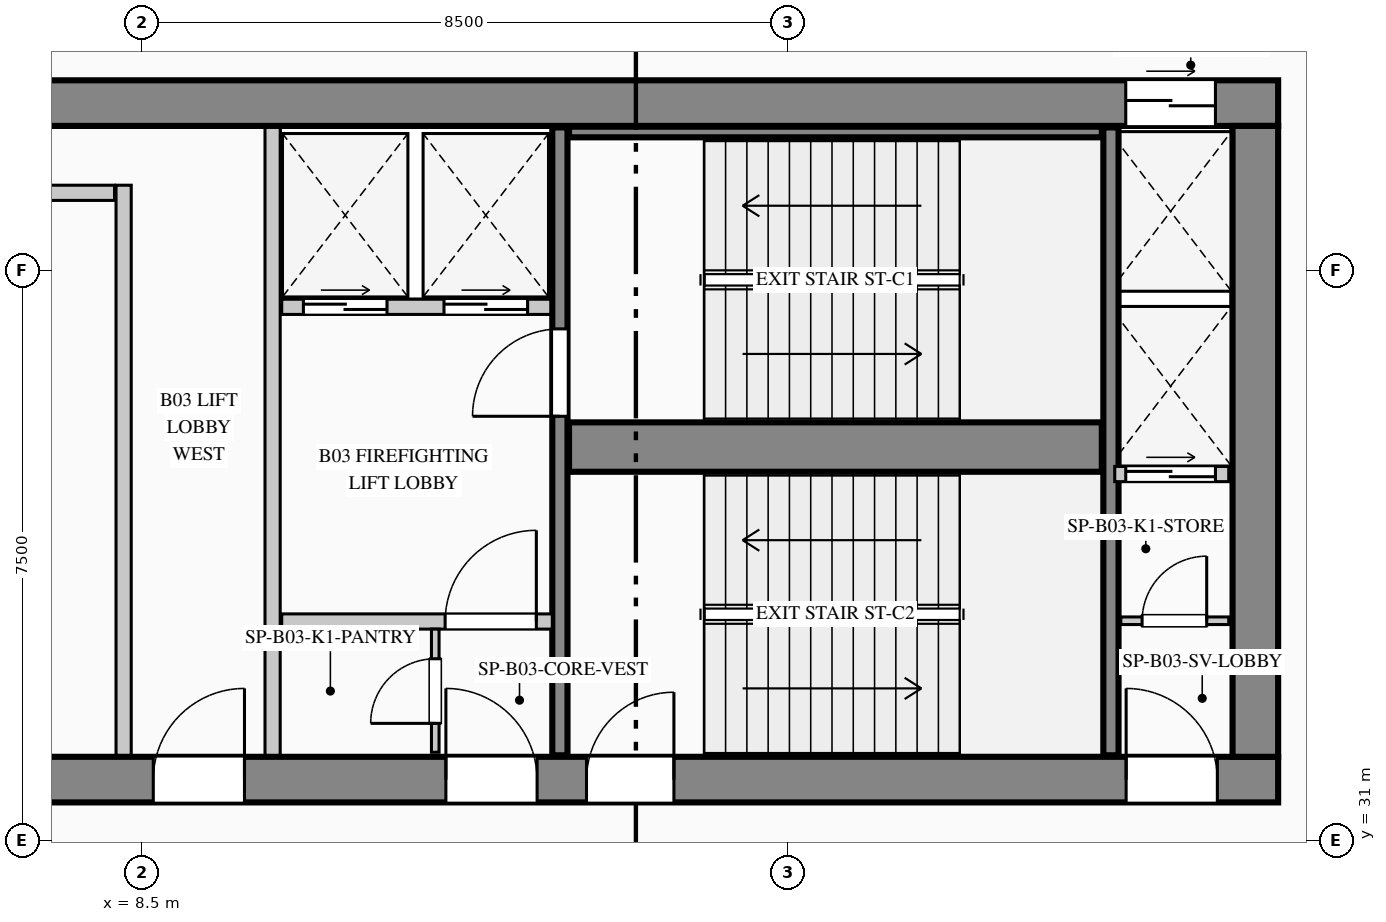
"""IFC4 building model, lengths in metres.
Left out: names, types, materials, properties, quantities, classifications, styles, units other than length and angle.
Written with IfcOpenShell. Run it as: python <this file> out.ifc"""

import sys

from ifc_helpers import new_model, si_unit, direction, frame, frame_2d, origin, place, context, subcontext, project, spatial, rectangle, extrude, element, fill, save


model = new_model("IFC4")
c1 = context("Model", 3, precision=1e-05, world=origin(), true_north=direction((0.0, 1.0)))
c2 = subcontext(c1, "Body", "Model", "MODEL_VIEW")
j1 = project(units=[si_unit("LENGTHUNIT", "METRE"), si_unit("PLANEANGLEUNIT", "RADIAN")], contexts=[c1])
p1 = place(None, origin())
s1 = spatial("IfcSite", under=j1, at=p1, CompositionType="ELEMENT")
p2 = place(p1, origin())
s2 = spatial("IfcBuilding", under=s1, at=p2, CompositionType="ELEMENT")
p3 = place(p2, frame((0.0, 0.0, -13.5)))
s3 = spatial("IfcBuildingStorey", under=s2, at=p3, CompositionType="ELEMENT", Elevation=-13.5)
p4 = place(p3, frame((5.4, 40.7, 0.0), z_axis=(0.0, 0.0, 1.0), x_axis=(1.0, 0.0, 0.0)))
e1 = element("IfcWall", 1, at=p4, inside=s3, PredefinedType="SHEAR", context=c2, shape_type="SweptSolid", body=[
    extrude(rectangle(XDim=18.05, YDim=0.6, at=frame_2d((9.025, 0.0))), origin(), (0.0, 0.0, 1.0), 4.5),
])
p5 = place(p4, frame((16.045, 0.0, 0.0)))
e2 = element("IfcOpeningElement", 2, at=p5, cuts=e1, PredefinedType="OPENING", context=c2, shape_type="SweptSolid", body=[
    extrude(rectangle(XDim=1.18, YDim=2.25, at=frame_2d((0.59, 1.125))), frame((0.0, 0.31, 0.0), z_axis=(0.0, -1.0, 0.0), x_axis=(1.0, 0.0, 0.0)), (0.0, 0.0, 1.0), 0.62),
])
p6 = place(p3, frame((5.4, 31.8, 0.0), z_axis=(0.0, 0.0, 1.0), x_axis=(1.0, 0.0, 0.0)))
e3 = element("IfcWall", 3, at=p6, inside=s3, PredefinedType="SHEAR", context=c2, shape_type="SweptSolid", body=[
    extrude(rectangle(XDim=18.05, YDim=0.6, at=frame_2d((9.025, 0.0))), origin(), (0.0, 0.0, 1.0), 4.5),
])
p7 = place(p6, frame((3.25, 0.0, 0.0)))
e4 = element("IfcOpeningElement", 4, at=p7, cuts=e3, PredefinedType="OPENING", context=c2, shape_type="SweptSolid", body=[
    extrude(rectangle(XDim=1.2, YDim=2.2, at=frame_2d((0.6, 1.1))), frame((0.0, 0.31, 0.0), z_axis=(0.0, -1.0, 0.0), x_axis=(1.0, 0.0, 0.0)), (0.0, 0.0, 1.0), 0.62),
])
p8 = place(p6, frame((7.1, 0.0, 0.0)))
e5 = element("IfcOpeningElement", 5, at=p8, cuts=e3, PredefinedType="OPENING", context=c2, shape_type="SweptSolid", body=[
    extrude(rectangle(XDim=1.2, YDim=2.2, at=frame_2d((0.6, 1.1))), frame((0.0, 0.31, 0.0), z_axis=(0.0, -1.0, 0.0), x_axis=(1.0, 0.0, 0.0)), (0.0, 0.0, 1.0), 0.62),
])
p9 = place(p6, frame((8.95, 0.0, 0.0)))
e6 = element("IfcOpeningElement", 6, at=p9, cuts=e3, PredefinedType="OPENING", context=c2, shape_type="SweptSolid", body=[
    extrude(rectangle(XDim=1.15, YDim=2.2, at=frame_2d((0.575, 1.1))), frame((0.0, 0.31, 0.0), z_axis=(0.0, -1.0, 0.0), x_axis=(1.0, 0.0, 0.0)), (0.0, 0.0, 1.0), 0.62),
])
p10 = place(p6, frame((16.05, 0.0, 0.0)))
e7 = element("IfcOpeningElement", 7, at=p10, cuts=e3, PredefinedType="OPENING", context=c2, shape_type="SweptSolid", body=[
    extrude(rectangle(XDim=1.2, YDim=2.2, at=frame_2d((0.6, 1.1))), frame((0.0, 0.31, 0.0), z_axis=(0.0, -1.0, 0.0), x_axis=(1.0, 0.0, 0.0)), (0.0, 0.0, 1.0), 0.62),
])
p11 = place(p3, frame((23.15, 32.1, 0.0), z_axis=(0.0, 0.0, 1.0), x_axis=(0.0, 1.0, 0.0)))
e8 = element("IfcWall", 8, at=p11, inside=s3, PredefinedType="SHEAR", context=c2, shape_type="SweptSolid", body=[
    extrude(rectangle(XDim=8.3, YDim=0.6, at=frame_2d((4.15, 0.0))), origin(), (0.0, 0.0, 1.0), 4.5),
])
p12 = place(p3, frame((14.0, 32.12, 0.0), z_axis=(0.0, 0.0, 1.0), x_axis=(0.0, 1.0, 0.0)))
e9 = element("IfcWall", 9, at=p12, inside=s3, PredefinedType="SHEAR", context=c2, shape_type="SweptSolid", body=[
    extrude(rectangle(XDim=8.26, YDim=0.2, at=frame_2d((4.13, 0.0))), origin(), (0.0, 0.0, 1.0), 4.5),
])
p13 = place(p12, frame((4.46, 0.0, 0.0)))
e10 = element("IfcOpeningElement", 10, at=p13, cuts=e9, PredefinedType="OPENING", context=c2, shape_type="SweptSolid", body=[
    extrude(rectangle(XDim=1.15, YDim=2.2, at=frame_2d((0.575, 1.1))), frame((0.0, 0.11, 0.0), z_axis=(0.0, -1.0, 0.0), x_axis=(1.0, 0.0, 0.0)), (0.0, 0.0, 1.0), 0.22),
])
p14 = place(p3, frame((14.12, 36.175, 0.0), z_axis=(0.0, 0.0, 1.0), x_axis=(1.0, 0.0, 0.0)))
e11 = element("IfcWall", 11, at=p14, inside=s3, PredefinedType="SHEAR", context=c2, shape_type="SweptSolid", body=[
    extrude(rectangle(XDim=7.01, YDim=0.65, at=frame_2d((3.505, 0.0))), origin(), (0.0, 0.0, 1.0), 4.5),
])
p15 = place(p3, frame((21.25, 32.12, 0.0), z_axis=(0.0, 0.0, 1.0), x_axis=(0.0, 1.0, 0.0)))
e12 = element("IfcWall", 12, at=p15, inside=s3, PredefinedType="SHEAR", context=c2, shape_type="SweptSolid", body=[
    extrude(rectangle(XDim=8.26, YDim=0.2, at=frame_2d((4.13, 0.0))), origin(), (0.0, 0.0, 1.0), 4.5),
])
p16 = place(p3, frame((14.12, 40.32, 0.0), z_axis=(0.0, 0.0, 1.0), x_axis=(1.0, 0.0, 0.0)))
e13 = element("IfcWall", 13, at=p16, inside=s3, PredefinedType="SHEAR", context=c2, shape_type="SweptSolid", body=[
    extrude(rectangle(XDim=7.01, YDim=0.14, at=frame_2d((3.505, 0.0))), origin(), (0.0, 0.0, 1.0), 4.5),
])
p17 = place(p3, frame((8.26, 32.12, 0.0), z_axis=(0.0, 0.0, 1.0), x_axis=(0.0, 1.0, 0.0)))
e14 = element("IfcWall", 14, at=p17, inside=s3, PredefinedType="PARTITIONING", context=c2, shape_type="SweptSolid", body=[
    extrude(rectangle(XDim=7.5, YDim=0.2, at=frame_2d((3.75, 0.0))), origin(), (0.0, 0.0, 1.0), 4.15),
])
p18 = place(p3, frame((6.02, 39.52, 0.0), z_axis=(0.0, 0.0, 1.0), x_axis=(1.0, 0.0, 0.0)))
e15 = element("IfcWall", 15, at=p18, inside=s3, PredefinedType="PARTITIONING", context=c2, shape_type="SweptSolid", body=[
    extrude(rectangle(XDim=2.12, YDim=0.2, at=frame_2d((1.06, 0.0))), origin(), (0.0, 0.0, 1.0), 4.15),
])
p19 = place(p3, frame((10.22, 32.12, 0.0), z_axis=(0.0, 0.0, 1.0), x_axis=(0.0, 1.0, 0.0)))
e16 = element("IfcWall", 16, at=p19, inside=s3, PredefinedType="PARTITIONING", context=c2, shape_type="SweptSolid", body=[
    extrude(rectangle(XDim=8.26, YDim=0.2, at=frame_2d((4.13, 0.0))), origin(), (0.0, 0.0, 1.0), 4.15),
])
p20 = place(p3, frame((10.34, 38.02, 0.0), z_axis=(0.0, 0.0, 1.0), x_axis=(1.0, 0.0, 0.0)))
e17 = element("IfcWall", 17, at=p20, inside=s3, PredefinedType="PARTITIONING", context=c2, shape_type="SweptSolid", body=[
    extrude(rectangle(XDim=3.54, YDim=0.2, at=frame_2d((1.77, 0.0))), origin(), (0.0, 0.0, 1.0), 4.15),
])
p21 = place(p20, frame((0.285, 0.0, 0.0)))
e18 = element("IfcOpeningElement", 18, at=p21, cuts=e17, PredefinedType="OPENING", context=c2, shape_type="SweptSolid", body=[
    extrude(rectangle(XDim=1.1, YDim=2.2, at=frame_2d((0.55, 1.1))), frame((0.0, 0.11, 0.0), z_axis=(0.0, -1.0, 0.0), x_axis=(1.0, 0.0, 0.0)), (0.0, 0.0, 1.0), 0.22),
])
p22 = place(p20, frame((2.135, 0.0, 0.0)))
e19 = element("IfcOpeningElement", 19, at=p22, cuts=e17, PredefinedType="OPENING", context=c2, shape_type="SweptSolid", body=[
    extrude(rectangle(XDim=1.1, YDim=2.2, at=frame_2d((0.55, 1.1))), frame((0.0, 0.11, 0.0), z_axis=(0.0, -1.0, 0.0), x_axis=(1.0, 0.0, 0.0)), (0.0, 0.0, 1.0), 0.22),
])
p23 = place(p3, frame((10.34, 33.88, 0.0), z_axis=(0.0, 0.0, 1.0), x_axis=(1.0, 0.0, 0.0)))
e20 = element("IfcWall", 20, at=p23, inside=s3, PredefinedType="PARTITIONING", context=c2, shape_type="SweptSolid", body=[
    extrude(rectangle(XDim=3.56, YDim=0.2, at=frame_2d((1.78, 0.0))), origin(), (0.0, 0.0, 1.0), 4.15),
])
p24 = place(p23, frame((2.15, 0.0, 0.0)))
e21 = element("IfcOpeningElement", 21, at=p24, cuts=e20, PredefinedType="OPENING", context=c2, shape_type="SweptSolid", body=[
    extrude(rectangle(XDim=1.2, YDim=2.2, at=frame_2d((0.6, 1.1))), frame((0.0, 0.11, 0.0), z_axis=(0.0, -1.0, 0.0), x_axis=(1.0, 0.0, 0.0)), (0.0, 0.0, 1.0), 0.22),
])
p25 = place(p3, frame((12.36, 32.16, 0.0), z_axis=(0.0, 0.0, 1.0), x_axis=(0.0, 1.0, 0.0)))
e22 = element("IfcWall", 22, at=p25, inside=s3, PredefinedType="PARTITIONING", context=c2, shape_type="SweptSolid", body=[
    extrude(rectangle(XDim=1.62, YDim=0.1, at=frame_2d((0.81, 0.0))), origin(), (0.0, 0.0, 1.0), 4.15),
])
p26 = place(p25, frame((0.38, 0.0, 0.0)))
e23 = element("IfcOpeningElement", 23, at=p26, cuts=e22, PredefinedType="OPENING", context=c2, shape_type="SweptSolid", body=[
    extrude(rectangle(XDim=0.85, YDim=2.1, at=frame_2d((0.425, 1.05))), frame((0.0, 0.06, 0.0), z_axis=(0.0, -1.0, 0.0), x_axis=(1.0, 0.0, 0.0)), (0.0, 0.0, 1.0), 0.12),
])
p27 = place(p3, frame((21.38, 33.89, 0.0), z_axis=(0.0, 0.0, 1.0), x_axis=(1.0, 0.0, 0.0)))
e24 = element("IfcWall", 24, at=p27, inside=s3, PredefinedType="PARTITIONING", context=c2, shape_type="SweptSolid", body=[
    extrude(rectangle(XDim=1.42, YDim=0.1, at=frame_2d((0.71, 0.0))), origin(), (0.0, 0.0, 1.0), 4.15),
])
p28 = place(p27, frame((0.28, 0.0, 0.0)))
e25 = element("IfcOpeningElement", 25, at=p28, cuts=e24, PredefinedType="OPENING", context=c2, shape_type="SweptSolid", body=[
    extrude(rectangle(XDim=0.85, YDim=2.1, at=frame_2d((0.425, 1.05))), frame((0.0, 0.06, 0.0), z_axis=(0.0, -1.0, 0.0), x_axis=(1.0, 0.0, 0.0)), (0.0, 0.0, 1.0), 0.12),
])
p29 = place(p3, frame((21.3, 35.82, 0.0), z_axis=(0.0, 0.0, 1.0), x_axis=(1.0, 0.0, 0.0)))
e26 = element("IfcWall", 26, at=p29, inside=s3, PredefinedType="PARTITIONING", context=c2, shape_type="SweptSolid", body=[
    extrude(rectangle(XDim=1.5, YDim=0.2, at=frame_2d((0.75, 0.0))), origin(), (0.0, 0.0, 1.0), 4.15),
])
p30 = place(p29, frame((0.145, 0.0, 0.0)))
e27 = element("IfcOpeningElement", 27, at=p30, cuts=e26, PredefinedType="OPENING", context=c2, shape_type="SweptSolid", body=[
    extrude(rectangle(XDim=1.18, YDim=2.25, at=frame_2d((0.59, 1.125))), frame((0.0, 0.11, 0.0), z_axis=(0.0, -1.0, 0.0), x_axis=(1.0, 0.0, 0.0)), (0.0, 0.0, 1.0), 0.22),
])
p31 = place(p7, origin())
e28 = element("IfcDoor", 28, at=p31, inside=s3, OperationType="SINGLE_SWING_RIGHT", PredefinedType="DOOR", context=c2, shape_type="SweptSolid", body=[
    extrude(rectangle(XDim=1.2, YDim=2.2, at=frame_2d((0.6, 1.1))), frame((0.0, 0.025, 0.0), z_axis=(0.0, -1.0, 0.0), x_axis=(1.0, 0.0, 0.0)), (0.0, 0.0, 1.0), 0.05),
])
fill(e4, e28)
p32 = place(p8, origin())
e29 = element("IfcDoor", 29, at=p32, inside=s3, OperationType="SINGLE_SWING_LEFT", PredefinedType="DOOR", context=c2, shape_type="SweptSolid", body=[
    extrude(rectangle(XDim=1.2, YDim=2.2, at=frame_2d((0.6, 1.1))), frame((0.0, 0.025, 0.0), z_axis=(0.0, -1.0, 0.0), x_axis=(1.0, 0.0, 0.0)), (0.0, 0.0, 1.0), 0.05),
])
fill(e5, e29)
p33 = place(p9, origin())
e30 = element("IfcDoor", 30, at=p33, inside=s3, OperationType="SINGLE_SWING_RIGHT", PredefinedType="DOOR", context=c2, shape_type="SweptSolid", body=[
    extrude(rectangle(XDim=1.15, YDim=2.2, at=frame_2d((0.575, 1.1))), frame((0.0, 0.025, 0.0), z_axis=(0.0, -1.0, 0.0), x_axis=(1.0, 0.0, 0.0)), (0.0, 0.0, 1.0), 0.05),
])
fill(e6, e30)
p34 = place(p10, origin())
e31 = element("IfcDoor", 31, at=p34, inside=s3, OperationType="SINGLE_SWING_LEFT", PredefinedType="DOOR", context=c2, shape_type="SweptSolid", body=[
    extrude(rectangle(XDim=1.2, YDim=2.2, at=frame_2d((0.6, 1.1))), frame((0.0, 0.025, 0.0), z_axis=(0.0, -1.0, 0.0), x_axis=(1.0, 0.0, 0.0)), (0.0, 0.0, 1.0), 0.05),
])
fill(e7, e31)
p35 = place(p24, origin())
e32 = element("IfcDoor", 32, at=p35, inside=s3, OperationType="SINGLE_SWING_RIGHT", PredefinedType="DOOR", context=c2, shape_type="SweptSolid", body=[
    extrude(rectangle(XDim=1.2, YDim=2.2, at=frame_2d((0.6, 1.1))), frame((0.0, 0.025, 0.0), z_axis=(0.0, -1.0, 0.0), x_axis=(1.0, 0.0, 0.0)), (0.0, 0.0, 1.0), 0.05),
])
fill(e21, e32)
p36 = place(p26, origin())
e33 = element("IfcDoor", 33, at=p36, inside=s3, OperationType="SINGLE_SWING_LEFT", PredefinedType="DOOR", context=c2, shape_type="SweptSolid", body=[
    extrude(rectangle(XDim=0.85, YDim=2.1, at=frame_2d((0.425, 1.05))), frame((0.0, 0.025, 0.0), z_axis=(0.0, -1.0, 0.0), x_axis=(1.0, 0.0, 0.0)), (0.0, 0.0, 1.0), 0.05),
])
fill(e23, e33)
p37 = place(p28, origin())
e34 = element("IfcDoor", 34, at=p37, inside=s3, OperationType="SINGLE_SWING_RIGHT", PredefinedType="DOOR", context=c2, shape_type="SweptSolid", body=[
    extrude(rectangle(XDim=0.85, YDim=2.1, at=frame_2d((0.425, 1.05))), frame((0.0, 0.025, 0.0), z_axis=(0.0, -1.0, 0.0), x_axis=(1.0, 0.0, 0.0)), (0.0, 0.0, 1.0), 0.05),
])
fill(e25, e34)
p38 = place(p13, origin())
e35 = element("IfcDoor", 35, at=p38, inside=s3, OperationType="SINGLE_SWING_LEFT", PredefinedType="DOOR", context=c2, shape_type="SweptSolid", body=[
    extrude(rectangle(XDim=1.15, YDim=2.2, at=frame_2d((0.575, 1.1))), frame((0.0, 0.025, 0.0), z_axis=(0.0, -1.0, 0.0), x_axis=(1.0, 0.0, 0.0)), (0.0, 0.0, 1.0), 0.05),
])
fill(e10, e35)
p39 = place(p21, origin())
e36 = element("IfcDoor", 36, at=p39, inside=s3, OperationType="DOUBLE_DOOR_SLIDING", PredefinedType="DOOR", context=c2, shape_type="SweptSolid", body=[
    extrude(rectangle(XDim=1.1, YDim=2.2, at=frame_2d((0.55, 1.1))), frame((0.0, 0.025, 0.0), z_axis=(0.0, -1.0, 0.0), x_axis=(1.0, 0.0, 0.0)), (0.0, 0.0, 1.0), 0.05),
])
fill(e18, e36)
p40 = place(p22, origin())
e37 = element("IfcDoor", 37, at=p40, inside=s3, OperationType="DOUBLE_DOOR_SLIDING", PredefinedType="DOOR", context=c2, shape_type="SweptSolid", body=[
    extrude(rectangle(XDim=1.1, YDim=2.2, at=frame_2d((0.55, 1.1))), frame((0.0, 0.025, 0.0), z_axis=(0.0, -1.0, 0.0), x_axis=(1.0, 0.0, 0.0)), (0.0, 0.0, 1.0), 0.05),
])
fill(e19, e37)
p41 = place(p5, origin())
e38 = element("IfcDoor", 38, at=p41, inside=s3, OperationType="DOUBLE_DOOR_SLIDING", PredefinedType="DOOR", context=c2, shape_type="SweptSolid", body=[
    extrude(rectangle(XDim=1.18, YDim=2.25, at=frame_2d((0.59, 1.125))), frame((0.0, 0.025, 0.0), z_axis=(0.0, -1.0, 0.0), x_axis=(1.0, 0.0, 0.0)), (0.0, 0.0, 1.0), 0.05),
])
fill(e2, e38)
p42 = place(p30, origin())
e39 = element("IfcDoor", 39, at=p42, inside=s3, OperationType="DOUBLE_DOOR_SLIDING", PredefinedType="DOOR", context=c2, shape_type="SweptSolid", body=[
    extrude(rectangle(XDim=1.18, YDim=2.25, at=frame_2d((0.59, 1.125))), frame((0.0, 0.025, 0.0), z_axis=(0.0, -1.0, 0.0), x_axis=(1.0, 0.0, 0.0)), (0.0, 0.0, 1.0), 0.05),
])
fill(e27, e39)
save(model, sys.argv[1])
